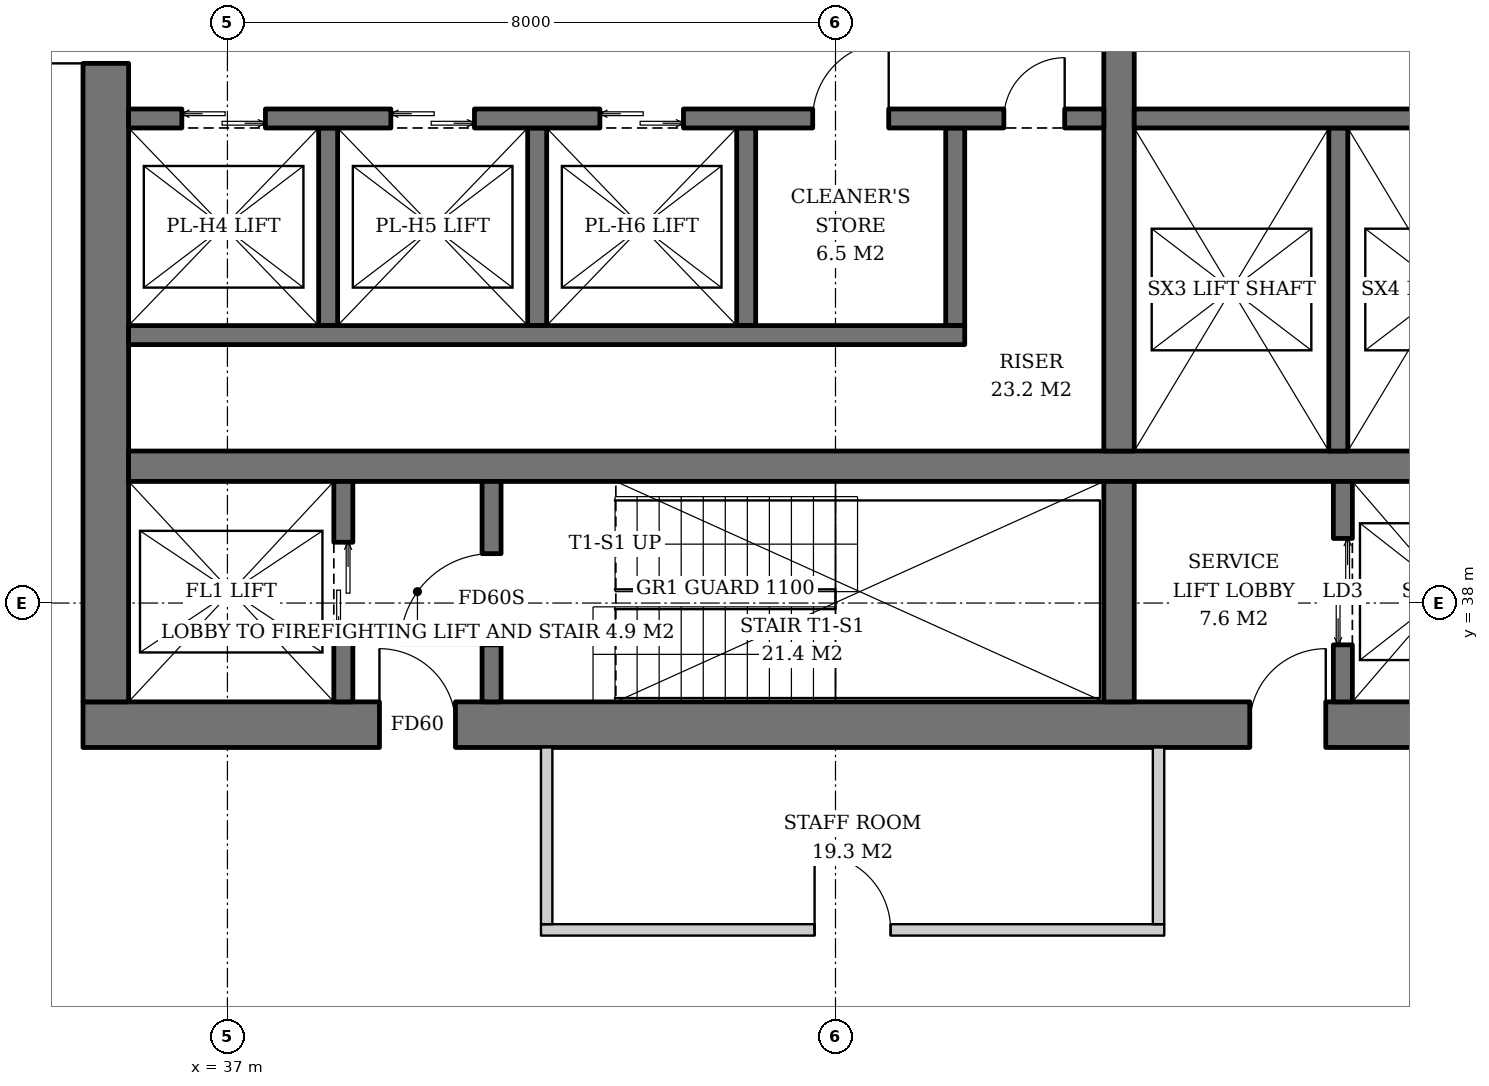
"""IFC4 building model, lengths in metres.
Left out: names, types, materials, properties, quantities, classifications, styles, units other than length and angle.
Written with IfcOpenShell. Run it as: python <this file> out.ifc"""

import sys

from ifc_helpers import new_model, si_unit, direction, frame, frame_2d, origin, place, context, subcontext, project, spatial, rectangle, extrude, element, fill, save


model = new_model("IFC4")
c1 = context("Model", 3, precision=1e-05, world=origin(), true_north=direction((0.0, 1.0)))
c2 = subcontext(c1, "Body", "Model", "MODEL_VIEW")
j1 = project(units=[si_unit("LENGTHUNIT", "METRE"), si_unit("PLANEANGLEUNIT", "RADIAN")], contexts=[c1])
p1 = place(None, origin())
s1 = spatial("IfcSite", under=j1, at=p1, CompositionType="ELEMENT")
p2 = place(p1, origin())
s2 = spatial("IfcBuilding", under=s1, at=p2, CompositionType="ELEMENT")
p3 = place(p2, frame((0.0, 0.0, 199.6)))
s3 = spatial("IfcBuildingStorey", under=s2, at=p3, CompositionType="ELEMENT", Elevation=199.6)
p4 = place(p3, frame((35.1, 36.4, 0.0), z_axis=(0.0, 0.0, 1.0), x_axis=(1.0, 0.0, 0.0)))
e1 = element("IfcWall", 1, at=p4, inside=s3, PredefinedType="SHEAR", context=c2, shape_type="SweptSolid", body=[
    extrude(rectangle(XDim=19.8, YDim=0.6, at=frame_2d((9.9, 0.0))), origin(), (0.0, 0.0, 1.0), 3.8),
])
p5 = place(p4, frame((3.9, 0.0, 0.0)))
e2 = element("IfcOpeningElement", 2, at=p5, cuts=e1, PredefinedType="OPENING", context=c2, shape_type="SweptSolid", body=[
    extrude(rectangle(XDim=1.0, YDim=2.1, at=frame_2d((0.5, 1.05))), frame((0.0, 0.31, 0.0), z_axis=(0.0, -1.0, 0.0), x_axis=(1.0, 0.0, 0.0)), (0.0, 0.0, 1.0), 0.62),
])
p6 = place(p4, frame((15.35, 0.0, 0.0)))
e3 = element("IfcOpeningElement", 3, at=p6, cuts=e1, PredefinedType="OPENING", context=c2, shape_type="SweptSolid", body=[
    extrude(rectangle(XDim=1.0, YDim=2.1, at=frame_2d((0.5, 1.05))), frame((0.0, 0.31, 0.0), z_axis=(0.0, -1.0, 0.0), x_axis=(1.0, 0.0, 0.0)), (0.0, 0.0, 1.0), 0.62),
])
p7 = place(p3, frame((35.4, 36.7, 0.0), z_axis=(0.0, 0.0, 1.0), x_axis=(0.0, 1.0, 0.0)))
e4 = element("IfcWall", 4, at=p7, inside=s3, PredefinedType="SHEAR", context=c2, shape_type="SweptSolid", body=[
    extrude(rectangle(XDim=18.6, YDim=0.6, at=frame_2d((9.3, 0.0))), origin(), (0.0, 0.0, 1.0), 3.8),
])
p8 = place(p7, frame((8.4, 0.0, 0.0)))
e5 = element("IfcOpeningElement", 5, at=p8, cuts=e4, PredefinedType="OPENING", context=c2, shape_type="SweptSolid", body=[
    extrude(rectangle(XDim=1.8, YDim=2.4, at=frame_2d((0.9, 1.2))), frame((0.0, 0.31, 0.0), z_axis=(0.0, -1.0, 0.0), x_axis=(1.0, 0.0, 0.0)), (0.0, 0.0, 1.0), 0.62),
])
p9 = place(p3, frame((35.7, 39.8, 0.0), z_axis=(0.0, 0.0, 1.0), x_axis=(1.0, 0.0, 0.0)))
e6 = element("IfcWall", 6, at=p9, inside=s3, PredefinedType="SHEAR", context=c2, shape_type="SweptSolid", body=[
    extrude(rectangle(XDim=18.6, YDim=0.4, at=frame_2d((9.3, 0.0))), origin(), (0.0, 0.0, 1.0), 3.8),
])
p10 = place(p3, frame((48.73, 36.7, 0.0), z_axis=(0.0, 0.0, 1.0), x_axis=(0.0, 1.0, 0.0)))
e7 = element("IfcWall", 7, at=p10, inside=s3, PredefinedType="SHEAR", context=c2, shape_type="SweptSolid", body=[
    extrude(rectangle(XDim=2.9, YDim=0.4, at=frame_2d((1.45, 0.0))), origin(), (0.0, 0.0, 1.0), 3.8),
])
p11 = place(p3, frame((48.73, 40.0, 0.0), z_axis=(0.0, 0.0, 1.0), x_axis=(0.0, 1.0, 0.0)))
e8 = element("IfcWall", 8, at=p11, inside=s3, PredefinedType="SHEAR", context=c2, shape_type="SweptSolid", body=[
    extrude(rectangle(XDim=12.0, YDim=0.4, at=frame_2d((6.0, 0.0))), origin(), (0.0, 0.0, 1.0), 3.8),
])
p12 = place(p3, frame((38.525, 36.7, 0.0), z_axis=(0.0, 0.0, 1.0), x_axis=(0.0, 1.0, 0.0)))
e9 = element("IfcWall", 9, at=p12, inside=s3, PredefinedType="SHEAR", context=c2, shape_type="SweptSolid", body=[
    extrude(rectangle(XDim=2.9, YDim=0.25, at=frame_2d((1.45, 0.0))), origin(), (0.0, 0.0, 1.0), 3.8),
])
p13 = place(p12, frame((0.8, 0.0, 0.0)))
e10 = element("IfcOpeningElement", 10, at=p13, cuts=e9, PredefinedType="OPENING", context=c2, shape_type="SweptSolid", body=[
    extrude(rectangle(XDim=1.3, YDim=2.2, at=frame_2d((0.65, 1.1))), frame((0.0, 0.135, 0.0), z_axis=(0.0, -1.0, 0.0), x_axis=(1.0, 0.0, 0.0)), (0.0, 0.0, 1.0), 0.27),
])
p14 = place(p3, frame((40.475, 36.7, 0.0), z_axis=(0.0, 0.0, 1.0), x_axis=(0.0, 1.0, 0.0)))
e11 = element("IfcWall", 11, at=p14, inside=s3, PredefinedType="SHEAR", context=c2, shape_type="SweptSolid", body=[
    extrude(rectangle(XDim=2.9, YDim=0.25, at=frame_2d((1.45, 0.0))), origin(), (0.0, 0.0, 1.0), 3.8),
])
p15 = place(p14, frame((0.75, 0.0, 0.0)))
e12 = element("IfcOpeningElement", 12, at=p15, cuts=e11, PredefinedType="OPENING", context=c2, shape_type="SweptSolid", body=[
    extrude(rectangle(XDim=1.2, YDim=2.1, at=frame_2d((0.6, 1.05))), frame((0.0, 0.135, 0.0), z_axis=(0.0, -1.0, 0.0), x_axis=(1.0, 0.0, 0.0)), (0.0, 0.0, 1.0), 0.27),
])
p16 = place(p3, frame((51.675, 36.7, 0.0), z_axis=(0.0, 0.0, 1.0), x_axis=(0.0, 1.0, 0.0)))
e13 = element("IfcWall", 13, at=p16, inside=s3, PredefinedType="SHEAR", context=c2, shape_type="SweptSolid", body=[
    extrude(rectangle(XDim=2.9, YDim=0.25, at=frame_2d((1.45, 0.0))), origin(), (0.0, 0.0, 1.0), 3.8),
])
p17 = place(p16, frame((0.75, 0.0, 0.0)))
e14 = element("IfcOpeningElement", 14, at=p17, cuts=e13, PredefinedType="OPENING", context=c2, shape_type="SweptSolid", body=[
    extrude(rectangle(XDim=1.4, YDim=2.4, at=frame_2d((0.7, 1.2))), frame((0.0, 0.135, 0.0), z_axis=(0.0, -1.0, 0.0), x_axis=(1.0, 0.0, 0.0)), (0.0, 0.0, 1.0), 0.27),
])
for number, where, z_axis, x_axis in (
    (15, (38.325, 44.25, 0.0), (0.0, 0.0, 1.0), (0.0, -1.0, 0.0)),
    (16, (41.075, 44.25, 0.0), (0.0, 0.0, 1.0), (0.0, -1.0, 0.0)),
    (17, (43.825, 44.25, 0.0), (0.0, 0.0, 1.0), (0.0, -1.0, 0.0)),
    (18, (46.575, 44.25, 0.0), (0.0, 0.0, 1.0), (0.0, -1.0, 0.0)),
):
    element("IfcWall", number, at=place(p3, frame(where, z_axis=z_axis, x_axis=x_axis)), inside=s3, PredefinedType="SHEAR", context=c2, shape_type="SweptSolid", body=[
        extrude(rectangle(XDim=2.6, YDim=0.25, at=frame_2d((1.3, 0.0))), origin(), (0.0, 0.0, 1.0), 3.8),
    ])
p18 = place(p3, frame((35.7, 41.525, 0.0), z_axis=(0.0, 0.0, 1.0), x_axis=(1.0, 0.0, 0.0)))
e19 = element("IfcWall", 19, at=p18, inside=s3, PredefinedType="SHEAR", context=c2, shape_type="SweptSolid", body=[
    extrude(rectangle(XDim=11.0, YDim=0.25, at=frame_2d((5.5, 0.0))), origin(), (0.0, 0.0, 1.0), 3.8),
])
p19 = place(p3, frame((35.7, 44.375, 0.0), z_axis=(0.0, 0.0, 1.0), x_axis=(1.0, 0.0, 0.0)))
e20 = element("IfcWall", 20, at=p19, inside=s3, PredefinedType="SHEAR", context=c2, shape_type="SweptSolid", body=[
    extrude(rectangle(XDim=12.83, YDim=0.25, at=frame_2d((6.415, 0.0))), origin(), (0.0, 0.0, 1.0), 3.8),
])
p20 = place(p19, frame((0.7, 0.0, 0.0)))
e21 = element("IfcOpeningElement", 21, at=p20, cuts=e20, PredefinedType="OPENING", context=c2, shape_type="SweptSolid", body=[
    extrude(rectangle(XDim=1.1, YDim=2.2, at=frame_2d((0.55, 1.1))), frame((0.0, 0.135, 0.0), z_axis=(0.0, -1.0, 0.0), x_axis=(1.0, 0.0, 0.0)), (0.0, 0.0, 1.0), 0.27),
])
p21 = place(p19, frame((3.45, 0.0, 0.0)))
e22 = element("IfcOpeningElement", 22, at=p21, cuts=e20, PredefinedType="OPENING", context=c2, shape_type="SweptSolid", body=[
    extrude(rectangle(XDim=1.1, YDim=2.2, at=frame_2d((0.55, 1.1))), frame((0.0, 0.135, 0.0), z_axis=(0.0, -1.0, 0.0), x_axis=(1.0, 0.0, 0.0)), (0.0, 0.0, 1.0), 0.27),
])
p22 = place(p19, frame((6.2, 0.0, 0.0)))
e23 = element("IfcOpeningElement", 23, at=p22, cuts=e20, PredefinedType="OPENING", context=c2, shape_type="SweptSolid", body=[
    extrude(rectangle(XDim=1.1, YDim=2.2, at=frame_2d((0.55, 1.1))), frame((0.0, 0.135, 0.0), z_axis=(0.0, -1.0, 0.0), x_axis=(1.0, 0.0, 0.0)), (0.0, 0.0, 1.0), 0.27),
])
p23 = place(p19, frame((9.0, 0.0, 0.0)))
e24 = element("IfcOpeningElement", 24, at=p23, cuts=e20, PredefinedType="OPENING", context=c2, shape_type="SweptSolid", body=[
    extrude(rectangle(XDim=1.0, YDim=2.1, at=frame_2d((0.5, 1.05))), frame((0.0, 0.135, 0.0), z_axis=(0.0, -1.0, 0.0), x_axis=(1.0, 0.0, 0.0)), (0.0, 0.0, 1.0), 0.27),
])
p24 = place(p19, frame((11.515, 0.0, 0.0)))
e25 = element("IfcOpeningElement", 25, at=p24, cuts=e20, PredefinedType="OPENING", context=c2, shape_type="SweptSolid", body=[
    extrude(rectangle(XDim=0.8, YDim=2.0, at=frame_2d((0.4, 1.0))), frame((0.0, 0.135, 0.0), z_axis=(0.0, -1.0, 0.0), x_axis=(1.0, 0.0, 0.0)), (0.0, 0.0, 1.0), 0.27),
])
p25 = place(p3, frame((51.615, 44.25, 0.0), z_axis=(0.0, 0.0, 1.0), x_axis=(0.0, -1.0, 0.0)))
e26 = element("IfcWall", 26, at=p25, inside=s3, PredefinedType="SHEAR", context=c2, shape_type="SweptSolid", body=[
    extrude(rectangle(XDim=4.25, YDim=0.25, at=frame_2d((2.125, 0.0))), origin(), (0.0, 0.0, 1.0), 3.8),
])
p26 = place(p3, frame((48.93, 44.375, 0.0), z_axis=(0.0, 0.0, 1.0), x_axis=(1.0, 0.0, 0.0)))
e27 = element("IfcWall", 27, at=p26, inside=s3, PredefinedType="SHEAR", context=c2, shape_type="SweptSolid", body=[
    extrude(rectangle(XDim=5.37, YDim=0.25, at=frame_2d((2.685, 0.0))), origin(), (0.0, 0.0, 1.0), 3.8),
])
p27 = place(p3, frame((41.125, 33.7, 0.0), z_axis=(0.0, 0.0, 1.0), x_axis=(1.0, 0.0, 0.0)))
e28 = element("IfcWall", 28, at=p27, inside=s3, PredefinedType="PARTITIONING", context=c2, shape_type="SweptSolid", body=[
    extrude(rectangle(XDim=8.2, YDim=0.15, at=frame_2d((4.1, 0.0))), origin(), (0.0, 0.0, 1.0), 2.867),
])
p28 = place(p27, frame((3.6, 0.0, 0.0)))
e29 = element("IfcOpeningElement", 29, at=p28, cuts=e28, PredefinedType="OPENING", context=c2, shape_type="SweptSolid", body=[
    extrude(rectangle(XDim=1.0, YDim=2.1, at=frame_2d((0.5, 1.05))), frame((0.0, 0.085, 0.0), z_axis=(0.0, -1.0, 0.0), x_axis=(1.0, 0.0, 0.0)), (0.0, 0.0, 1.0), 0.17),
])
for number, where, z_axis, x_axis in (
    (30, (41.2, 36.1, 0.0), (0.0, 0.0, 1.0), (0.0, -1.0, 0.0)),
    (31, (49.25, 36.1, 0.0), (0.0, 0.0, 1.0), (0.0, -1.0, 0.0)),
):
    element("IfcWall", number, at=place(p3, frame(where, z_axis=z_axis, x_axis=x_axis)), inside=s3, PredefinedType="PARTITIONING", context=c2, shape_type="SweptSolid", body=[
        extrude(rectangle(XDim=2.325, YDim=0.15, at=frame_2d((1.163, 0.0))), origin(), (0.0, 0.0, 1.0), 3.62),
    ])
p29 = place(p13, origin())
e32 = element("IfcDoor", 32, at=p29, inside=s3, OperationType="DOUBLE_DOOR_SLIDING", PredefinedType="DOOR", context=c2, shape_type="SweptSolid", body=[
    extrude(rectangle(XDim=1.3, YDim=2.2, at=frame_2d((0.65, 1.1))), frame((0.0, 0.025, 0.0), z_axis=(0.0, -1.0, 0.0), x_axis=(1.0, 0.0, 0.0)), (0.0, 0.0, 1.0), 0.05),
])
fill(e10, e32)
p30 = place(p15, origin())
e33 = element("IfcDoor", 33, at=p30, inside=s3, OperationType="SINGLE_SWING_LEFT", PredefinedType="DOOR", context=c2, shape_type="SweptSolid", body=[
    extrude(rectangle(XDim=1.2, YDim=2.1, at=frame_2d((0.6, 1.05))), frame((0.0, 0.025, 0.0), z_axis=(0.0, -1.0, 0.0), x_axis=(1.0, 0.0, 0.0)), (0.0, 0.0, 1.0), 0.05),
])
fill(e12, e33)
p31 = place(p17, origin())
e34 = element("IfcDoor", 34, at=p31, inside=s3, OperationType="DOUBLE_DOOR_SLIDING", PredefinedType="DOOR", context=c2, shape_type="SweptSolid", body=[
    extrude(rectangle(XDim=1.4, YDim=2.4, at=frame_2d((0.7, 1.2))), frame((0.0, 0.025, 0.0), z_axis=(0.0, -1.0, 0.0), x_axis=(1.0, 0.0, 0.0)), (0.0, 0.0, 1.0), 0.05),
])
fill(e14, e34)
p32 = place(p20, origin())
e35 = element("IfcDoor", 35, at=p32, inside=s3, OperationType="DOUBLE_DOOR_SLIDING", PredefinedType="DOOR", context=c2, shape_type="SweptSolid", body=[
    extrude(rectangle(XDim=1.1, YDim=2.2, at=frame_2d((0.55, 1.1))), frame((0.0, 0.025, 0.0), z_axis=(0.0, -1.0, 0.0), x_axis=(1.0, 0.0, 0.0)), (0.0, 0.0, 1.0), 0.05),
])
fill(e21, e35)
p33 = place(p21, origin())
e36 = element("IfcDoor", 36, at=p33, inside=s3, OperationType="DOUBLE_DOOR_SLIDING", PredefinedType="DOOR", context=c2, shape_type="SweptSolid", body=[
    extrude(rectangle(XDim=1.1, YDim=2.2, at=frame_2d((0.55, 1.1))), frame((0.0, 0.025, 0.0), z_axis=(0.0, -1.0, 0.0), x_axis=(1.0, 0.0, 0.0)), (0.0, 0.0, 1.0), 0.05),
])
fill(e22, e36)
p34 = place(p22, origin())
e37 = element("IfcDoor", 37, at=p34, inside=s3, OperationType="DOUBLE_DOOR_SLIDING", PredefinedType="DOOR", context=c2, shape_type="SweptSolid", body=[
    extrude(rectangle(XDim=1.1, YDim=2.2, at=frame_2d((0.55, 1.1))), frame((0.0, 0.025, 0.0), z_axis=(0.0, -1.0, 0.0), x_axis=(1.0, 0.0, 0.0)), (0.0, 0.0, 1.0), 0.05),
])
fill(e23, e37)
p35 = place(p23, origin())
e38 = element("IfcDoor", 38, at=p35, inside=s3, OperationType="SINGLE_SWING_RIGHT", PredefinedType="DOOR", context=c2, shape_type="SweptSolid", body=[
    extrude(rectangle(XDim=1.0, YDim=2.1, at=frame_2d((0.5, 1.05))), frame((0.0, 0.025, 0.0), z_axis=(0.0, -1.0, 0.0), x_axis=(1.0, 0.0, 0.0)), (0.0, 0.0, 1.0), 0.05),
])
fill(e24, e38)
p36 = place(p24, origin())
e39 = element("IfcDoor", 39, at=p36, inside=s3, OperationType="SINGLE_SWING_RIGHT", PredefinedType="DOOR", context=c2, shape_type="SweptSolid", body=[
    extrude(rectangle(XDim=0.8, YDim=2.0, at=frame_2d((0.4, 1.0))), frame((0.0, 0.025, 0.0), z_axis=(0.0, -1.0, 0.0), x_axis=(1.0, 0.0, 0.0)), (0.0, 0.0, 1.0), 0.05),
])
fill(e25, e39)
p37 = place(p5, origin())
e40 = element("IfcDoor", 40, at=p37, inside=s3, OperationType="SINGLE_SWING_LEFT", PredefinedType="DOOR", context=c2, shape_type="SweptSolid", body=[
    extrude(rectangle(XDim=1.0, YDim=2.1, at=frame_2d((0.5, 1.05))), frame((0.0, 0.025, 0.0), z_axis=(0.0, -1.0, 0.0), x_axis=(1.0, 0.0, 0.0)), (0.0, 0.0, 1.0), 0.05),
])
fill(e2, e40)
p38 = place(p8, origin())
e41 = element("IfcDoor", 41, at=p38, inside=s3, OperationType="DOUBLE_DOOR_SINGLE_SWING", PredefinedType="DOOR", context=c2, shape_type="SweptSolid", body=[
    extrude(rectangle(XDim=1.8, YDim=2.4, at=frame_2d((0.9, 1.2))), frame((0.0, 0.025, 0.0), z_axis=(0.0, -1.0, 0.0), x_axis=(1.0, 0.0, 0.0)), (0.0, 0.0, 1.0), 0.05),
])
fill(e5, e41)
p39 = place(p6, origin())
e42 = element("IfcDoor", 42, at=p39, inside=s3, OperationType="SINGLE_SWING_RIGHT", PredefinedType="DOOR", context=c2, shape_type="SweptSolid", body=[
    extrude(rectangle(XDim=1.0, YDim=2.1, at=frame_2d((0.5, 1.05))), frame((0.0, 0.025, 0.0), z_axis=(0.0, -1.0, 0.0), x_axis=(1.0, 0.0, 0.0)), (0.0, 0.0, 1.0), 0.05),
])
fill(e3, e42)
p40 = place(p28, origin())
e43 = element("IfcDoor", 43, at=p40, inside=s3, OperationType="SINGLE_SWING_LEFT", PredefinedType="DOOR", context=c2, shape_type="SweptSolid", body=[
    extrude(rectangle(XDim=1.0, YDim=2.1, at=frame_2d((0.5, 1.05))), frame((0.0, 0.025, 0.0), z_axis=(0.0, -1.0, 0.0), x_axis=(1.0, 0.0, 0.0)), (0.0, 0.0, 1.0), 0.05),
])
fill(e29, e43)
save(model, sys.argv[1])
